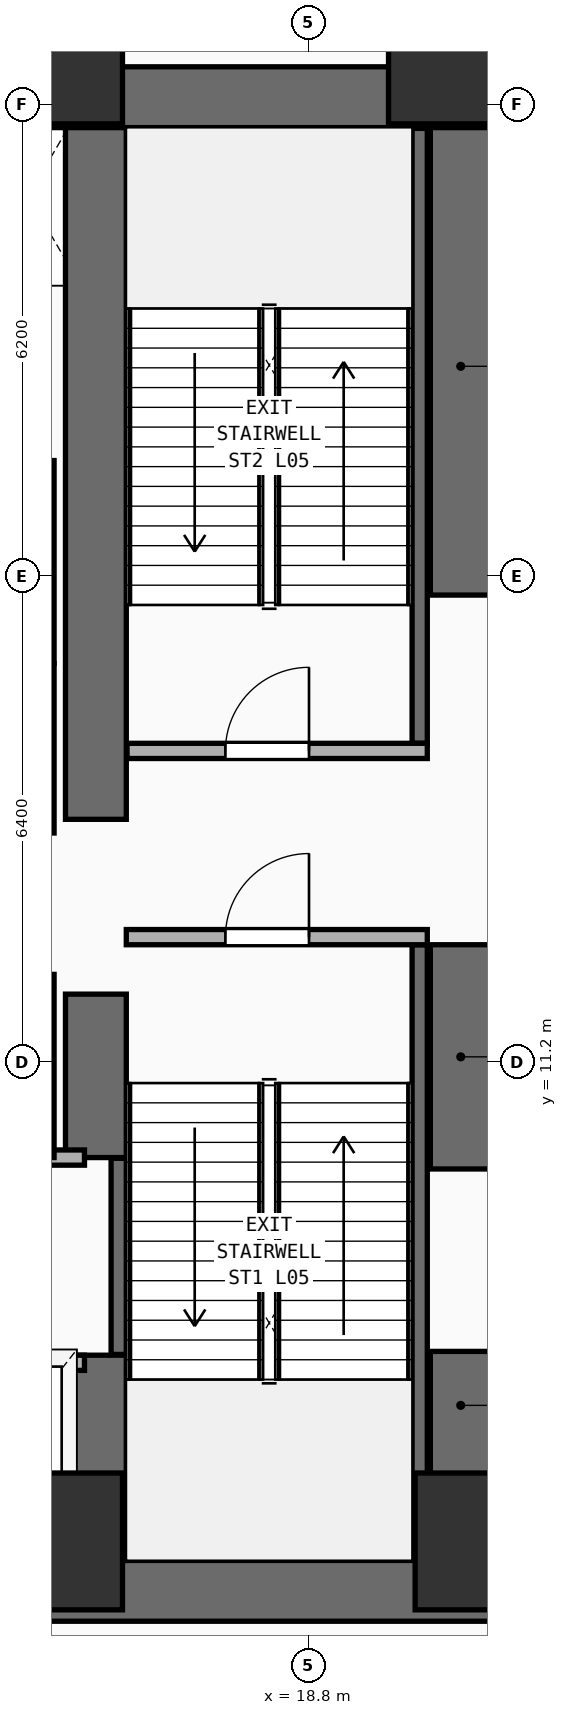
"""IFC4 building model, lengths in metres.
Left out: names, types, materials, properties, quantities, classifications, styles, units other than length and angle.
Written with IfcOpenShell. Run it as: python <this file> out.ifc"""

import sys

from ifc_helpers import new_model, si_unit, direction, frame, frame_2d, origin, origin_2d, place, context, subcontext, project, spatial, rectangle, extrude, element, fill, save


model = new_model("IFC4")
c1 = context("Model", 3, precision=1e-05, world=origin(), true_north=direction((0.0, 1.0)))
c2 = subcontext(c1, "Body", "Model", "MODEL_VIEW")
j1 = project(units=[si_unit("LENGTHUNIT", "METRE"), si_unit("PLANEANGLEUNIT", "RADIAN")], contexts=[c1])
p1 = place(None, origin())
s1 = spatial("IfcSite", under=j1, at=p1, CompositionType="ELEMENT")
p2 = place(p1, origin())
s2 = spatial("IfcBuilding", under=s1, at=p2, CompositionType="ELEMENT")
p3 = place(p2, frame((0.0, 0.0, 20.0)))
s3 = spatial("IfcBuildingStorey", under=s2, at=p3, CompositionType="ELEMENT", Elevation=20.0)
for number, where, z_axis, x_axis in (
    (1, (7.05, 4.25, 0.0), (0.0, 0.0, 1.0), (1.0, 0.0, 0.0)),
    (2, (7.05, 23.9, 0.0), (0.0, 0.0, 1.0), (1.0, 0.0, 0.0)),
):
    element("IfcWall", number, at=place(p3, frame(where, z_axis=z_axis, x_axis=x_axis)), inside=s3, PredefinedType="SHEAR", context=c2, shape_type="SweptSolid", body=[
        extrude(rectangle(XDim=14.15, YDim=0.8, at=frame_2d((7.075, 0.0))), origin(), (0.0, 0.0, 1.0), 4.46),
    ])
p4 = place(p3, frame((20.8, 4.65, 0.0), z_axis=(0.0, 0.0, 1.0), x_axis=(0.0, 1.0, 0.0)))
e3 = element("IfcWall", 3, at=p4, inside=s3, PredefinedType="SHEAR", context=c2, shape_type="SweptSolid", body=[
    extrude(rectangle(XDim=2.75, YDim=0.8, at=frame_2d((1.375, 0.0))), origin(), (0.0, 0.0, 1.0), 4.46),
])
p5 = place(p3, frame((20.8, 9.8, 0.0), z_axis=(0.0, 0.0, 1.0), x_axis=(0.0, 1.0, 0.0)))
e4 = element("IfcWall", 4, at=p5, inside=s3, PredefinedType="SHEAR", context=c2, shape_type="SweptSolid", body=[
    extrude(rectangle(XDim=2.95, YDim=0.8, at=frame_2d((1.475, 0.0))), origin(), (0.0, 0.0, 1.0), 4.46),
])
p6 = place(p3, frame((20.8, 17.35, 0.0), z_axis=(0.0, 0.0, 1.0), x_axis=(0.0, 1.0, 0.0)))
e5 = element("IfcWall", 5, at=p6, inside=s3, PredefinedType="SHEAR", context=c2, shape_type="SweptSolid", body=[
    extrude(rectangle(XDim=6.15, YDim=0.8, at=frame_2d((3.075, 0.0))), origin(), (0.0, 0.0, 1.0), 4.46),
])
p7 = place(p3, frame((16.0, 4.65, 0.0), z_axis=(0.0, 0.0, 1.0), x_axis=(0.0, 1.0, 0.0)))
e6 = element("IfcWall", 6, at=p7, inside=s3, PredefinedType="SHEAR", context=c2, shape_type="SweptSolid", body=[
    extrude(rectangle(XDim=2.7, YDim=0.8, at=frame_2d((1.35, 0.0))), origin(), (0.0, 0.0, 1.0), 4.46),
])
p8 = place(p3, frame((16.0, 9.95, 0.0), z_axis=(0.0, 0.0, 1.0), x_axis=(0.0, 1.0, 0.0)))
e7 = element("IfcWall", 7, at=p8, inside=s3, PredefinedType="SHEAR", context=c2, shape_type="SweptSolid", body=[
    extrude(rectangle(XDim=2.15, YDim=0.8, at=frame_2d((1.075, 0.0))), origin(), (0.0, 0.0, 1.0), 4.46),
])
p9 = place(p3, frame((16.0, 14.4, 0.0), z_axis=(0.0, 0.0, 1.0), x_axis=(0.0, 1.0, 0.0)))
e8 = element("IfcWall", 8, at=p9, inside=s3, PredefinedType="SHEAR", context=c2, shape_type="SweptSolid", body=[
    extrude(rectangle(XDim=9.1, YDim=0.8, at=frame_2d((4.55, 0.0))), origin(), (0.0, 0.0, 1.0), 4.46),
])
for number, where, z_axis, x_axis in (
    (9, (15.45, 4.9, 0.0), (0.0, 0.0, 1.0), (1.0, 0.0, 0.0)),
    (10, (21.1, 4.9, 0.0), (0.0, 0.0, 1.0), (1.0, 0.0, 0.0)),
    (11, (15.45, 24.45, 0.0), (0.0, 0.0, 1.0), (1.0, 0.0, 0.0)),
    (12, (20.75, 24.45, 0.0), (0.0, 0.0, 1.0), (1.0, 0.0, 0.0)),
):
    element("IfcColumn", number, at=place(p3, frame(where, z_axis=z_axis, x_axis=x_axis)), inside=s3, PredefinedType="COLUMN", context=c2, shape_type="SweptSolid", body=[
        extrude(rectangle(XDim=1.8, YDim=1.8, at=origin_2d()), origin(), (0.0, 0.0, 1.0), 4.46),
    ])
p10 = place(p3, frame((16.3, 7.36, 0.0), z_axis=(0.0, 0.0, 1.0), x_axis=(0.0, 1.0, 0.0)))
e13 = element("IfcWall", 13, at=p10, inside=s3, PredefinedType="SHEAR", context=c2, shape_type="SweptSolid", body=[
    extrude(rectangle(XDim=2.58, YDim=0.2, at=frame_2d((1.29, 0.0))), origin(), (0.0, 0.0, 1.0), 4.46),
])
p11 = place(p3, frame((20.26, 4.66, 0.0), z_axis=(0.0, 0.0, 1.0), x_axis=(0.0, 1.0, 0.0)))
e14 = element("IfcWall", 14, at=p11, inside=s3, PredefinedType="SHEAR", context=c2, shape_type="SweptSolid", body=[
    extrude(rectangle(XDim=8.09, YDim=0.2, at=frame_2d((4.045, 0.0))), origin(), (0.0, 0.0, 1.0), 4.46),
])
p12 = place(p3, frame((16.4, 12.85, 0.0), z_axis=(0.0, 0.0, 1.0), x_axis=(1.0, 0.0, 0.0)))
e15 = element("IfcWall", 15, at=p12, inside=s3, PredefinedType="PARTITIONING", context=c2, shape_type="SweptSolid", body=[
    extrude(rectangle(XDim=3.96, YDim=0.2, at=frame_2d((1.98, 0.0))), origin(), (0.0, 0.0, 1.0), 4.46),
])
p13 = place(p12, frame((1.304, 0.0, 0.0)))
e16 = element("IfcOpeningElement", 16, at=p13, cuts=e15, PredefinedType="OPENING", context=c2, shape_type="SweptSolid", body=[
    extrude(rectangle(XDim=1.1, YDim=2.2, at=frame_2d((0.55, 1.1))), frame((0.0, 0.11, 0.0), z_axis=(0.0, -1.0, 0.0), x_axis=(1.0, 0.0, 0.0)), (0.0, 0.0, 1.0), 0.22),
])
p14 = place(p3, frame((20.26, 15.4, 0.0), z_axis=(0.0, 0.0, 1.0), x_axis=(0.0, 1.0, 0.0)))
e17 = element("IfcWall", 17, at=p14, inside=s3, PredefinedType="SHEAR", context=c2, shape_type="SweptSolid", body=[
    extrude(rectangle(XDim=8.09, YDim=0.2, at=frame_2d((4.045, 0.0))), origin(), (0.0, 0.0, 1.0), 4.46),
])
p15 = place(p3, frame((16.41, 15.3, 0.0), z_axis=(0.0, 0.0, 1.0), x_axis=(1.0, 0.0, 0.0)))
e18 = element("IfcWall", 18, at=p15, inside=s3, PredefinedType="PARTITIONING", context=c2, shape_type="SweptSolid", body=[
    extrude(rectangle(XDim=3.95, YDim=0.2, at=frame_2d((1.975, 0.0))), origin(), (0.0, 0.0, 1.0), 4.46),
])
p16 = place(p15, frame((1.294, 0.0, 0.0)))
e19 = element("IfcOpeningElement", 19, at=p16, cuts=e18, PredefinedType="OPENING", context=c2, shape_type="SweptSolid", body=[
    extrude(rectangle(XDim=1.1, YDim=2.2, at=frame_2d((0.55, 1.1))), frame((0.0, 0.11, 0.0), z_axis=(0.0, -1.0, 0.0), x_axis=(1.0, 0.0, 0.0)), (0.0, 0.0, 1.0), 0.22),
])
p17 = place(p3, frame((7.5, 7.25, 0.0), z_axis=(0.0, 0.0, 1.0), x_axis=(1.0, 0.0, 0.0)))
e20 = element("IfcWall", 20, at=p17, inside=s3, PredefinedType="PARTITIONING", context=c2, shape_type="SweptSolid", body=[
    extrude(rectangle(XDim=8.35, YDim=0.2, at=frame_2d((4.175, 0.0))), origin(), (0.0, 0.0, 1.0), 4.46),
])
p18 = place(p17, frame((0.53, 0.0, 0.0)))
e21 = element("IfcOpeningElement", 21, at=p18, cuts=e20, PredefinedType="OPENING", context=c2, shape_type="SweptSolid", body=[
    extrude(rectangle(XDim=1.1, YDim=2.2, at=frame_2d((0.55, 1.1))), frame((0.0, 0.11, 0.0), z_axis=(0.0, -1.0, 0.0), x_axis=(1.0, 0.0, 0.0)), (0.0, 0.0, 1.0), 0.22),
])
p19 = place(p17, frame((2.37, 0.0, 0.0)))
e22 = element("IfcOpeningElement", 22, at=p19, cuts=e20, PredefinedType="OPENING", context=c2, shape_type="SweptSolid", body=[
    extrude(rectangle(XDim=1.1, YDim=2.2, at=frame_2d((0.55, 1.1))), frame((0.0, 0.11, 0.0), z_axis=(0.0, -1.0, 0.0), x_axis=(1.0, 0.0, 0.0)), (0.0, 0.0, 1.0), 0.22),
])
p20 = place(p17, frame((4.33, 0.0, 0.0)))
e23 = element("IfcOpeningElement", 23, at=p20, cuts=e20, PredefinedType="OPENING", context=c2, shape_type="SweptSolid", body=[
    extrude(rectangle(XDim=1.1, YDim=2.2, at=frame_2d((0.55, 1.1))), frame((0.0, 0.11, 0.0), z_axis=(0.0, -1.0, 0.0), x_axis=(1.0, 0.0, 0.0)), (0.0, 0.0, 1.0), 0.22),
])
p21 = place(p17, frame((6.5, 0.0, 0.0)))
e24 = element("IfcOpeningElement", 24, at=p21, cuts=e20, PredefinedType="OPENING", context=c2, shape_type="SweptSolid", body=[
    extrude(rectangle(XDim=1.1, YDim=2.2, at=frame_2d((0.55, 1.1))), frame((0.0, 0.11, 0.0), z_axis=(0.0, -1.0, 0.0), x_axis=(1.0, 0.0, 0.0)), (0.0, 0.0, 1.0), 0.22),
])
p22 = place(p3, frame((7.5, 9.95, 0.0), z_axis=(0.0, 0.0, 1.0), x_axis=(1.0, 0.0, 0.0)))
e25 = element("IfcWall", 25, at=p22, inside=s3, PredefinedType="PARTITIONING", context=c2, shape_type="SweptSolid", body=[
    extrude(rectangle(XDim=8.35, YDim=0.2, at=frame_2d((4.175, 0.0))), origin(), (0.0, 0.0, 1.0), 4.46),
])
p23 = place(p3, frame((15.35, 9.95, 0.0), z_axis=(0.0, 0.0, 1.0), x_axis=(0.0, 1.0, 0.0)))
e26 = element("IfcWall", 26, at=p23, inside=s3, PredefinedType="PARTITIONING", context=c2, shape_type="SweptSolid", body=[
    extrude(rectangle(XDim=2.41, YDim=0.2, at=frame_2d((1.205, 0.0))), origin(), (0.0, 0.0, 1.0), 4.46),
])
p24 = place(p3, frame((15.35, 14.22, 0.0), z_axis=(0.0, 0.0, 1.0), x_axis=(0.0, 1.0, 0.0)))
e27 = element("IfcWall", 27, at=p24, inside=s3, PredefinedType="PARTITIONING", context=c2, shape_type="SweptSolid", body=[
    extrude(rectangle(XDim=2.23, YDim=0.2, at=frame_2d((1.115, 0.0))), origin(), (0.0, 0.0, 1.0), 4.46),
])
p25 = place(p3, frame((15.35, 16.45, 0.0), z_axis=(0.0, 0.0, 1.0), x_axis=(0.0, 1.0, 0.0)))
e28 = element("IfcWall", 28, at=p25, inside=s3, PredefinedType="PARTITIONING", context=c2, shape_type="SweptSolid", body=[
    extrude(rectangle(XDim=2.67, YDim=0.2, at=frame_2d((1.335, 0.0))), origin(), (0.0, 0.0, 1.0), 4.46),
])
p26 = place(p13, frame((1.1, 0.0, 0.0), z_axis=(0.0, 0.0, 1.0), x_axis=(-1.0, 0.0, 0.0)))
e29 = element("IfcDoor", 29, at=p26, inside=s3, OperationType="SINGLE_SWING_LEFT", PredefinedType="DOOR", context=c2, shape_type="SweptSolid", body=[
    extrude(rectangle(XDim=1.1, YDim=2.2, at=frame_2d((0.55, 1.1))), frame((0.0, 0.025, 0.0), z_axis=(0.0, -1.0, 0.0), x_axis=(1.0, 0.0, 0.0)), (0.0, 0.0, 1.0), 0.05),
])
fill(e16, e29)
p27 = place(p16, origin())
e30 = element("IfcDoor", 30, at=p27, inside=s3, OperationType="SINGLE_SWING_RIGHT", PredefinedType="DOOR", context=c2, shape_type="SweptSolid", body=[
    extrude(rectangle(XDim=1.1, YDim=2.2, at=frame_2d((0.55, 1.1))), frame((0.0, 0.025, 0.0), z_axis=(0.0, -1.0, 0.0), x_axis=(1.0, 0.0, 0.0)), (0.0, 0.0, 1.0), 0.05),
])
fill(e19, e30)
save(model, sys.argv[1])
